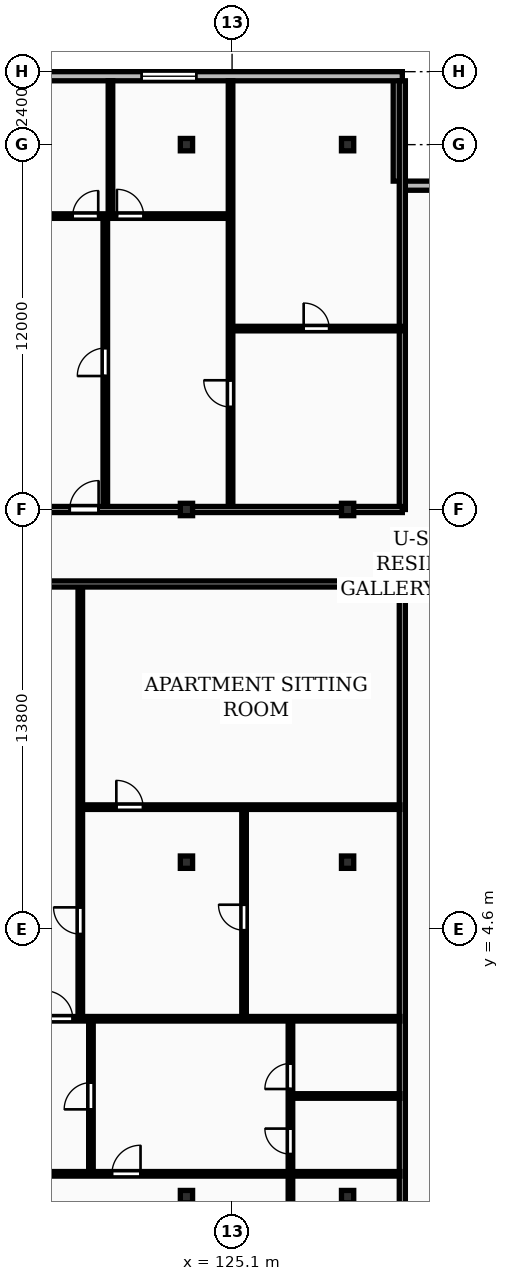
"""IFC4 building model, lengths in metres.
Left out: names, types, materials, properties, quantities, classifications, styles, units other than length and angle.
Written with IfcOpenShell. Run it as: python <this file> out.ifc"""

import sys

from ifc_helpers import new_model, si_unit, direction, frame, frame_2d, origin, origin_2d, place, context, subcontext, project, spatial, rectangle, i_section, extrude, element, fill, save


model = new_model("IFC4")
c1 = context("Model", 3, precision=1e-05, world=origin(), true_north=direction((0.0, 1.0)))
c2 = subcontext(c1, "Body", "Model", "MODEL_VIEW")
j1 = project(units=[si_unit("LENGTHUNIT", "METRE"), si_unit("PLANEANGLEUNIT", "RADIAN")], contexts=[c1])
p1 = place(None, origin())
s1 = spatial("IfcSite", under=j1, at=p1, CompositionType="ELEMENT")
p2 = place(p1, origin())
s2 = spatial("IfcBuilding", under=s1, at=p2, CompositionType="ELEMENT")
p3 = place(p2, frame((0.0, 0.0, 153.7)))
s3 = spatial("IfcBuildingStorey", under=s2, at=p3, CompositionType="ELEMENT", Elevation=153.7)
for number, where, z_axis, x_axis in (
    (1, (123.6, -4.2, 0.0), (0.0, 0.0, 1.0), (1.0, 0.0, 0.0)),
    (2, (123.6, 6.8, 0.0), (0.0, 0.0, 1.0), (1.0, 0.0, 0.0)),
    (3, (123.6, 18.4, 0.0), (0.0, 0.0, 1.0), (1.0, 0.0, 0.0)),
    (4, (123.6, 30.4, 0.0), (0.0, 0.0, 1.0), (1.0, 0.0, 0.0)),
    (5, (128.9, -4.2, 0.0), (0.0, 0.0, 1.0), (1.0, 0.0, 0.0)),
    (6, (128.9, 6.8, 0.0), (0.0, 0.0, 1.0), (1.0, 0.0, 0.0)),
    (7, (128.9, 18.4, 0.0), (0.0, 0.0, 1.0), (1.0, 0.0, 0.0)),
    (8, (128.9, 30.4, 0.0), (0.0, 0.0, 1.0), (1.0, 0.0, 0.0)),
):
    element("IfcColumn", number, at=place(p3, frame(where, z_axis=z_axis, x_axis=x_axis)), inside=s3, PredefinedType="COLUMN", context=c2, shape_type="SweptSolid", body=[
        extrude(i_section(OverallWidth=0.403, OverallDepth=0.406, WebThickness=0.027, FlangeThickness=0.043, FilletRadius=0.015, at=origin_2d()), origin(), (0.0, 0.0, 1.0), 3.6),
    ])
for number, where, z_axis, x_axis in (
    (9, (134.3, 29.05, 0.0), (0.0, 0.0, 1.0), (-1.0, 0.0, 0.0)),
    (10, (130.55, 29.2, 0.0), (0.0, 0.0, 1.0), (0.0, 1.0, 0.0)),
):
    element("IfcWall", number, at=place(p3, frame(where, z_axis=z_axis, x_axis=x_axis)), inside=s3, PredefinedType="STANDARD", context=c2, shape_type="SweptSolid", body=[
        extrude(rectangle(XDim=3.6, YDim=0.3, at=frame_2d((1.8, 0.0))), origin(), (0.0, 0.0, 1.0), 3.32),
    ])
p4 = place(p3, frame((130.7, 32.65, 0.0), z_axis=(0.0, 0.0, 1.0), x_axis=(-1.0, 0.0, 0.0)))
e11 = element("IfcWall", 11, at=p4, inside=s3, PredefinedType="STANDARD", context=c2, shape_type="SweptSolid", body=[
    extrude(rectangle(XDim=58.0, YDim=0.3, at=frame_2d((29.0, 0.0))), origin(), (0.0, 0.0, 1.0), 3.32),
])
p5 = place(p4, frame((50.125, 0.0, 0.85)))
e12 = element("IfcOpeningElement", 12, at=p5, cuts=e11, PredefinedType="OPENING", context=c2, shape_type="SweptSolid", body=[
    extrude(rectangle(XDim=1.8, YDim=1.8, at=frame_2d((0.9, 0.9))), frame((0.0, 0.16, 0.0), z_axis=(0.0, -1.0, 0.0), x_axis=(1.0, 0.0, 0.0)), (0.0, 0.0, 1.0), 0.32),
])
p6 = place(p4, frame((6.775, 0.0, 0.85)))
e13 = element("IfcOpeningElement", 13, at=p6, cuts=e11, PredefinedType="OPENING", context=c2, shape_type="SweptSolid", body=[
    extrude(rectangle(XDim=1.8, YDim=1.8, at=frame_2d((0.9, 0.9))), frame((0.0, 0.16, 0.0), z_axis=(0.0, -1.0, 0.0), x_axis=(1.0, 0.0, 0.0)), (0.0, 0.0, 1.0), 0.32),
])
p7 = place(p4, frame((38.0, 0.0, 0.0)))
e14 = element("IfcOpeningElement", 14, at=p7, cuts=e11, PredefinedType="OPENING", context=c2, shape_type="SweptSolid", body=[
    extrude(rectangle(XDim=1.1, YDim=2.1, at=frame_2d((0.55, 1.05))), frame((0.0, 0.16, 0.0), z_axis=(0.0, -1.0, 0.0), x_axis=(1.0, 0.0, 0.0)), (0.0, 0.0, 1.0), 0.32),
])
p8 = place(p3, frame((130.7, 18.4, 0.0), z_axis=(0.0, 0.0, 1.0), x_axis=(0.0, 1.0, 0.0)))
e15 = element("IfcWall", 15, at=p8, inside=s3, PredefinedType="PARTITIONING", context=c2, shape_type="SweptSolid", body=[
    extrude(rectangle(XDim=14.1, YDim=0.2, at=frame_2d((7.05, 0.0))), origin(), (0.0, 0.0, 1.0), 3.32),
])
p9 = place(p3, frame((125.05, 24.35, 0.0), z_axis=(0.0, 0.0, 1.0), x_axis=(1.0, 0.0, 0.0)))
e16 = element("IfcWall", 16, at=p9, inside=s3, PredefinedType="PARTITIONING", context=c2, shape_type="SweptSolid", body=[
    extrude(rectangle(XDim=5.65, YDim=0.15, at=frame_2d((2.825, 0.0))), origin(), (0.0, 0.0, 1.0), 3.32),
])
p10 = place(p9, frame((2.405, 0.0, 0.0)))
e17 = element("IfcOpeningElement", 17, at=p10, cuts=e16, PredefinedType="OPENING", context=c2, shape_type="SweptSolid", body=[
    extrude(rectangle(XDim=0.84, YDim=2.04, at=frame_2d((0.42, 1.02))), frame((0.0, 0.085, 0.0), z_axis=(0.0, -1.0, 0.0), x_axis=(1.0, 0.0, 0.0)), (0.0, 0.0, 1.0), 0.17),
])
p11 = place(p3, frame((125.05, 18.45, 0.0), z_axis=(0.0, 0.0, 1.0), x_axis=(0.0, 1.0, 0.0)))
e18 = element("IfcWall", 18, at=p11, inside=s3, PredefinedType="PARTITIONING", context=c2, shape_type="SweptSolid", body=[
    extrude(rectangle(XDim=14.05, YDim=0.15, at=frame_2d((7.025, 0.0))), origin(), (0.0, 0.0, 1.0), 3.32),
])
p12 = place(p11, frame((3.32, 0.0, 0.0)))
e19 = element("IfcOpeningElement", 19, at=p12, cuts=e18, PredefinedType="OPENING", context=c2, shape_type="SweptSolid", body=[
    extrude(rectangle(XDim=0.88, YDim=2.06, at=frame_2d((0.44, 1.03))), frame((0.0, 0.085, 0.0), z_axis=(0.0, -1.0, 0.0), x_axis=(1.0, 0.0, 0.0)), (0.0, 0.0, 1.0), 0.17),
])
p13 = place(p3, frame((120.93, 18.45, 0.0), z_axis=(0.0, 0.0, 1.0), x_axis=(0.0, 1.0, 0.0)))
e20 = element("IfcWall", 20, at=p13, inside=s3, PredefinedType="PARTITIONING", context=c2, shape_type="SweptSolid", body=[
    extrude(rectangle(XDim=9.6, YDim=0.15, at=frame_2d((4.8, 0.0))), origin(), (0.0, 0.0, 1.0), 3.32),
])
p14 = place(p13, frame((4.34, 0.0, 0.0)))
e21 = element("IfcOpeningElement", 21, at=p14, cuts=e20, PredefinedType="OPENING", context=c2, shape_type="SweptSolid", body=[
    extrude(rectangle(XDim=0.92, YDim=2.08, at=frame_2d((0.46, 1.04))), frame((0.0, 0.085, 0.0), z_axis=(0.0, -1.0, 0.0), x_axis=(1.0, 0.0, 0.0)), (0.0, 0.0, 1.0), 0.17),
])
p15 = place(p3, frame((121.1, 28.05, 0.0), z_axis=(0.0, 0.0, 1.0), x_axis=(0.0, 1.0, 0.0)))
e22 = element("IfcWall", 22, at=p15, inside=s3, PredefinedType="PARTITIONING", context=c2, shape_type="SweptSolid", body=[
    extrude(rectangle(XDim=4.45, YDim=0.15, at=frame_2d((2.225, 0.0))), origin(), (0.0, 0.0, 1.0), 3.32),
])
p16 = place(p3, frame((118.27, 28.05, 0.0), z_axis=(0.0, 0.0, 1.0), x_axis=(1.0, 0.0, 0.0)))
e23 = element("IfcWall", 23, at=p16, inside=s3, PredefinedType="PARTITIONING", context=c2, shape_type="SweptSolid", body=[
    extrude(rectangle(XDim=6.76, YDim=0.15, at=frame_2d((3.38, 0.0))), origin(), (0.0, 0.0, 1.0), 3.32),
])
p17 = place(p16, frame((1.587, 0.0, 0.0)))
e24 = element("IfcOpeningElement", 24, at=p17, cuts=e23, PredefinedType="OPENING", context=c2, shape_type="SweptSolid", body=[
    extrude(rectangle(XDim=0.84, YDim=2.04, at=frame_2d((0.42, 1.02))), frame((0.0, 0.085, 0.0), z_axis=(0.0, -1.0, 0.0), x_axis=(1.0, 0.0, 0.0)), (0.0, 0.0, 1.0), 0.17),
])
p18 = place(p16, frame((3.042, 0.0, 0.0)))
e25 = element("IfcOpeningElement", 25, at=p18, cuts=e23, PredefinedType="OPENING", context=c2, shape_type="SweptSolid", body=[
    extrude(rectangle(XDim=0.88, YDim=2.06, at=frame_2d((0.44, 1.03))), frame((0.0, 0.085, 0.0), z_axis=(0.0, -1.0, 0.0), x_axis=(1.0, 0.0, 0.0)), (0.0, 0.0, 1.0), 0.17),
])
p19 = place(p3, frame((118.25, 18.4, 0.0), z_axis=(0.0, 0.0, 1.0), x_axis=(1.0, 0.0, 0.0)))
e26 = element("IfcWall", 26, at=p19, inside=s3, PredefinedType="PARTITIONING", context=c2, shape_type="SweptSolid", body=[
    extrude(rectangle(XDim=12.45, YDim=0.2, at=frame_2d((6.225, 0.0))), origin(), (0.0, 0.0, 1.0), 2.708),
])
p20 = place(p19, frame((1.51, 0.0, 0.0)))
e27 = element("IfcOpeningElement", 27, at=p20, cuts=e26, PredefinedType="OPENING", context=c2, shape_type="SweptSolid", body=[
    extrude(rectangle(XDim=0.95, YDim=2.15, at=frame_2d((0.475, 1.075))), frame((0.0, 0.11, 0.0), z_axis=(0.0, -1.0, 0.0), x_axis=(1.0, 0.0, 0.0)), (0.0, 0.0, 1.0), 0.22),
])
p21 = place(p3, frame((130.7, -8.7, 0.0), z_axis=(0.0, 0.0, 1.0), x_axis=(0.0, 1.0, 0.0)))
e28 = element("IfcWall", 28, at=p21, inside=s3, PredefinedType="PARTITIONING", context=c2, shape_type="SweptSolid", body=[
    extrude(rectangle(XDim=24.57, YDim=0.2, at=frame_2d((12.285, 0.0))), origin(), (0.0, 0.0, 1.0), 3.32),
])
p22 = place(p3, frame((125.494, 1.69, 0.0), z_axis=(0.0, 0.0, 1.0), x_axis=(0.0, 1.0, 0.0)))
e29 = element("IfcWall", 29, at=p22, inside=s3, PredefinedType="PARTITIONING", context=c2, shape_type="SweptSolid", body=[
    extrude(rectangle(XDim=6.92, YDim=0.15, at=frame_2d((3.46, 0.0))), origin(), (0.0, 0.0, 1.0), 3.32),
])
p23 = place(p22, frame((2.871, 0.0, 0.0)))
e30 = element("IfcOpeningElement", 30, at=p23, cuts=e29, PredefinedType="OPENING", context=c2, shape_type="SweptSolid", body=[
    extrude(rectangle(XDim=0.84, YDim=2.04, at=frame_2d((0.42, 1.02))), frame((0.0, 0.085, 0.0), z_axis=(0.0, -1.0, 0.0), x_axis=(1.0, 0.0, 0.0)), (0.0, 0.0, 1.0), 0.17),
])
p24 = place(p3, frame((120.168, 8.61, 0.0), z_axis=(0.0, 0.0, 1.0), x_axis=(1.0, 0.0, 0.0)))
e31 = element("IfcWall", 31, at=p24, inside=s3, PredefinedType="PARTITIONING", context=c2, shape_type="SweptSolid", body=[
    extrude(rectangle(XDim=10.452, YDim=0.15, at=frame_2d((5.226, 0.0))), origin(), (0.0, 0.0, 1.0), 3.32),
])
p25 = place(p24, frame((1.125, 0.0, 0.0)))
e32 = element("IfcOpeningElement", 32, at=p25, cuts=e31, PredefinedType="OPENING", context=c2, shape_type="SweptSolid", body=[
    extrude(rectangle(XDim=0.88, YDim=2.06, at=frame_2d((0.44, 1.03))), frame((0.0, 0.085, 0.0), z_axis=(0.0, -1.0, 0.0), x_axis=(1.0, 0.0, 0.0)), (0.0, 0.0, 1.0), 0.17),
])
p26 = place(p3, frame((120.108, 1.69, 0.0), z_axis=(0.0, 0.0, 1.0), x_axis=(0.0, 1.0, 0.0)))
e33 = element("IfcWall", 33, at=p26, inside=s3, PredefinedType="PARTITIONING", context=c2, shape_type="SweptSolid", body=[
    extrude(rectangle(XDim=14.2, YDim=0.15, at=frame_2d((7.1, 0.0))), origin(), (0.0, 0.0, 1.0), 3.32),
])
p27 = place(p26, frame((2.744, 0.0, 0.0)))
e34 = element("IfcOpeningElement", 34, at=p27, cuts=e33, PredefinedType="OPENING", context=c2, shape_type="SweptSolid", body=[
    extrude(rectangle(XDim=0.88, YDim=2.06, at=frame_2d((0.44, 1.03))), frame((0.0, 0.085, 0.0), z_axis=(0.0, -1.0, 0.0), x_axis=(1.0, 0.0, 0.0)), (0.0, 0.0, 1.0), 0.17),
])
p28 = place(p3, frame((120.458, -3.39, 0.0), z_axis=(0.0, 0.0, 1.0), x_axis=(0.0, 1.0, 0.0)))
e35 = element("IfcWall", 35, at=p28, inside=s3, PredefinedType="PARTITIONING", context=c2, shape_type="SweptSolid", body=[
    extrude(rectangle(XDim=5.0, YDim=0.15, at=frame_2d((2.5, 0.0))), origin(), (0.0, 0.0, 1.0), 3.32),
])
p29 = place(p28, frame((2.06, 0.0, 0.0)))
e36 = element("IfcOpeningElement", 36, at=p29, cuts=e35, PredefinedType="OPENING", context=c2, shape_type="SweptSolid", body=[
    extrude(rectangle(XDim=0.88, YDim=2.06, at=frame_2d((0.44, 1.03))), frame((0.0, 0.085, 0.0), z_axis=(0.0, -1.0, 0.0), x_axis=(1.0, 0.0, 0.0)), (0.0, 0.0, 1.0), 0.17),
])
p30 = place(p3, frame((127.08, -0.89, 0.0), z_axis=(0.0, 0.0, 1.0), x_axis=(1.0, 0.0, 0.0)))
e37 = element("IfcWall", 37, at=p30, inside=s3, PredefinedType="PARTITIONING", context=c2, shape_type="SweptSolid", body=[
    extrude(rectangle(XDim=3.54, YDim=0.15, at=frame_2d((1.77, 0.0))), origin(), (0.0, 0.0, 1.0), 3.32),
])
p31 = place(p3, frame((127.02, -8.7, 0.0), z_axis=(0.0, 0.0, 1.0), x_axis=(0.0, 1.0, 0.0)))
e38 = element("IfcWall", 38, at=p31, inside=s3, PredefinedType="PARTITIONING", context=c2, shape_type="SweptSolid", body=[
    extrude(rectangle(XDim=10.31, YDim=0.15, at=frame_2d((5.155, 0.0))), origin(), (0.0, 0.0, 1.0), 3.32),
])
p32 = place(p31, frame((5.897, 0.0, 0.0)))
e39 = element("IfcOpeningElement", 39, at=p32, cuts=e38, PredefinedType="OPENING", context=c2, shape_type="SweptSolid", body=[
    extrude(rectangle(XDim=0.84, YDim=2.04, at=frame_2d((0.42, 1.02))), frame((0.0, 0.085, 0.0), z_axis=(0.0, -1.0, 0.0), x_axis=(1.0, 0.0, 0.0)), (0.0, 0.0, 1.0), 0.17),
])
p33 = place(p31, frame((8.04, 0.0, 0.0)))
e40 = element("IfcOpeningElement", 40, at=p33, cuts=e38, PredefinedType="OPENING", context=c2, shape_type="SweptSolid", body=[
    extrude(rectangle(XDim=0.84, YDim=2.04, at=frame_2d((0.42, 1.02))), frame((0.0, 0.085, 0.0), z_axis=(0.0, -1.0, 0.0), x_axis=(1.0, 0.0, 0.0)), (0.0, 0.0, 1.0), 0.17),
])
p34 = place(p31, frame((2.21, 0.0, 0.0)))
e41 = element("IfcOpeningElement", 41, at=p34, cuts=e38, PredefinedType="OPENING", context=c2, shape_type="SweptSolid", body=[
    extrude(rectangle(XDim=0.88, YDim=2.06, at=frame_2d((0.44, 1.03))), frame((0.0, 0.085, 0.0), z_axis=(0.0, -1.0, 0.0), x_axis=(1.0, 0.0, 0.0)), (0.0, 0.0, 1.0), 0.17),
])
p35 = place(p3, frame((116.218, 1.65, 0.0), z_axis=(0.0, 0.0, 1.0), x_axis=(1.0, 0.0, 0.0)))
e42 = element("IfcWall", 42, at=p35, inside=s3, PredefinedType="PARTITIONING", context=c2, shape_type="SweptSolid", body=[
    extrude(rectangle(XDim=14.402, YDim=0.15, at=frame_2d((7.201, 0.0))), origin(), (0.0, 0.0, 1.0), 3.32),
])
p36 = place(p35, frame((2.72, 0.0, 0.0)))
e43 = element("IfcOpeningElement", 43, at=p36, cuts=e42, PredefinedType="OPENING", context=c2, shape_type="SweptSolid", body=[
    extrude(rectangle(XDim=0.92, YDim=2.08, at=frame_2d((0.46, 1.04))), frame((0.0, 0.085, 0.0), z_axis=(0.0, -1.0, 0.0), x_axis=(1.0, 0.0, 0.0)), (0.0, 0.0, 1.0), 0.17),
])
p37 = place(p3, frame((116.218, -3.45, 0.0), z_axis=(0.0, 0.0, 1.0), x_axis=(1.0, 0.0, 0.0)))
e44 = element("IfcWall", 44, at=p37, inside=s3, PredefinedType="PARTITIONING", context=c2, shape_type="SweptSolid", body=[
    extrude(rectangle(XDim=14.402, YDim=0.15, at=frame_2d((7.201, 0.0))), origin(), (0.0, 0.0, 1.0), 3.32),
])
p38 = place(p37, frame((4.931, 0.0, 0.0)))
e45 = element("IfcOpeningElement", 45, at=p38, cuts=e44, PredefinedType="OPENING", context=c2, shape_type="SweptSolid", body=[
    extrude(rectangle(XDim=0.94, YDim=2.1, at=frame_2d((0.47, 1.05))), frame((0.0, 0.085, 0.0), z_axis=(0.0, -1.0, 0.0), x_axis=(1.0, 0.0, 0.0)), (0.0, 0.0, 1.0), 0.17),
])
p39 = place(p3, frame((72.7, 15.95, 0.0), z_axis=(0.0, 0.0, 1.0), x_axis=(1.0, 0.0, 0.0)))
e46 = element("IfcWall", 46, at=p39, inside=s3, PredefinedType="PARTITIONING", context=c2, shape_type="SweptSolid", body=[
    extrude(rectangle(XDim=58.0, YDim=0.2, at=frame_2d((29.0, 0.0))), origin(), (0.0, 0.0, 1.0), 3.32),
])
p40 = place(p39, frame((10.967, 0.0, 0.0)))
e47 = element("IfcOpeningElement", 47, at=p40, cuts=e46, PredefinedType="OPENING", context=c2, shape_type="SweptSolid", body=[
    extrude(rectangle(XDim=1.22, YDim=2.18, at=frame_2d((0.61, 1.09))), frame((0.0, 0.11, 0.0), z_axis=(0.0, -1.0, 0.0), x_axis=(1.0, 0.0, 0.0)), (0.0, 0.0, 1.0), 0.22),
])
p41 = place(p39, frame((31.36, 0.0, 0.0)))
e48 = element("IfcOpeningElement", 48, at=p41, cuts=e46, PredefinedType="OPENING", context=c2, shape_type="SweptSolid", body=[
    extrude(rectangle(XDim=1.22, YDim=2.18, at=frame_2d((0.61, 1.09))), frame((0.0, 0.11, 0.0), z_axis=(0.0, -1.0, 0.0), x_axis=(1.0, 0.0, 0.0)), (0.0, 0.0, 1.0), 0.22),
])
p42 = place(p39, frame((45.483, 0.0, 0.0)))
e49 = element("IfcOpeningElement", 49, at=p42, cuts=e46, PredefinedType="OPENING", context=c2, shape_type="SweptSolid", body=[
    extrude(rectangle(XDim=0.95, YDim=2.15, at=frame_2d((0.475, 1.075))), frame((0.0, 0.11, 0.0), z_axis=(0.0, -1.0, 0.0), x_axis=(1.0, 0.0, 0.0)), (0.0, 0.0, 1.0), 0.22),
])
p43 = place(p6, origin())
e50 = element("IfcWindow", 50, at=p43, inside=s3, PartitioningType="SINGLE_PANEL", PredefinedType="WINDOW", context=c2, shape_type="SweptSolid", body=[
    extrude(rectangle(XDim=1.8, YDim=1.8, at=frame_2d((0.9, 0.9))), frame((0.0, 0.03, 0.0), z_axis=(0.0, -1.0, 0.0), x_axis=(1.0, 0.0, 0.0)), (0.0, 0.0, 1.0), 0.06),
])
fill(e13, e50)
p44 = place(p10, origin())
e51 = element("IfcDoor", 51, at=p44, inside=s3, OperationType="SINGLE_SWING_LEFT", PredefinedType="DOOR", context=c2, shape_type="SweptSolid", body=[
    extrude(rectangle(XDim=0.84, YDim=2.04, at=frame_2d((0.42, 1.02))), frame((0.0, 0.025, 0.0), z_axis=(0.0, -1.0, 0.0), x_axis=(1.0, 0.0, 0.0)), (0.0, 0.0, 1.0), 0.05),
])
fill(e17, e51)
p45 = place(p12, origin())
e52 = element("IfcDoor", 52, at=p45, inside=s3, OperationType="SINGLE_SWING_RIGHT", PredefinedType="DOOR", context=c2, shape_type="SweptSolid", body=[
    extrude(rectangle(XDim=0.88, YDim=2.06, at=frame_2d((0.44, 1.03))), frame((0.0, 0.025, 0.0), z_axis=(0.0, -1.0, 0.0), x_axis=(1.0, 0.0, 0.0)), (0.0, 0.0, 1.0), 0.05),
])
fill(e19, e52)
p46 = place(p14, origin())
e53 = element("IfcDoor", 53, at=p46, inside=s3, OperationType="SINGLE_SWING_LEFT", PredefinedType="DOOR", context=c2, shape_type="SweptSolid", body=[
    extrude(rectangle(XDim=0.92, YDim=2.08, at=frame_2d((0.46, 1.04))), frame((0.0, 0.025, 0.0), z_axis=(0.0, -1.0, 0.0), x_axis=(1.0, 0.0, 0.0)), (0.0, 0.0, 1.0), 0.05),
])
fill(e21, e53)
p47 = place(p17, origin())
e54 = element("IfcDoor", 54, at=p47, inside=s3, OperationType="SINGLE_SWING_RIGHT", PredefinedType="DOOR", context=c2, shape_type="SweptSolid", body=[
    extrude(rectangle(XDim=0.84, YDim=2.04, at=frame_2d((0.42, 1.02))), frame((0.0, 0.025, 0.0), z_axis=(0.0, -1.0, 0.0), x_axis=(1.0, 0.0, 0.0)), (0.0, 0.0, 1.0), 0.05),
])
fill(e24, e54)
p48 = place(p18, origin())
e55 = element("IfcDoor", 55, at=p48, inside=s3, OperationType="SINGLE_SWING_LEFT", PredefinedType="DOOR", context=c2, shape_type="SweptSolid", body=[
    extrude(rectangle(XDim=0.88, YDim=2.06, at=frame_2d((0.44, 1.03))), frame((0.0, 0.025, 0.0), z_axis=(0.0, -1.0, 0.0), x_axis=(1.0, 0.0, 0.0)), (0.0, 0.0, 1.0), 0.05),
])
fill(e25, e55)
p49 = place(p20, origin())
e56 = element("IfcDoor", 56, at=p49, inside=s3, OperationType="SINGLE_SWING_RIGHT", PredefinedType="DOOR", context=c2, shape_type="SweptSolid", body=[
    extrude(rectangle(XDim=0.95, YDim=2.15, at=frame_2d((0.475, 1.075))), frame((0.0, 0.025, 0.0), z_axis=(0.0, -1.0, 0.0), x_axis=(1.0, 0.0, 0.0)), (0.0, 0.0, 1.0), 0.05),
])
fill(e27, e56)
p50 = place(p23, origin())
e57 = element("IfcDoor", 57, at=p50, inside=s3, OperationType="SINGLE_SWING_RIGHT", PredefinedType="DOOR", context=c2, shape_type="SweptSolid", body=[
    extrude(rectangle(XDim=0.84, YDim=2.04, at=frame_2d((0.42, 1.02))), frame((0.0, 0.025, 0.0), z_axis=(0.0, -1.0, 0.0), x_axis=(1.0, 0.0, 0.0)), (0.0, 0.0, 1.0), 0.05),
])
fill(e30, e57)
p51 = place(p25, origin())
e58 = element("IfcDoor", 58, at=p51, inside=s3, OperationType="SINGLE_SWING_LEFT", PredefinedType="DOOR", context=c2, shape_type="SweptSolid", body=[
    extrude(rectangle(XDim=0.88, YDim=2.06, at=frame_2d((0.44, 1.03))), frame((0.0, 0.025, 0.0), z_axis=(0.0, -1.0, 0.0), x_axis=(1.0, 0.0, 0.0)), (0.0, 0.0, 1.0), 0.05),
])
fill(e32, e58)
p52 = place(p27, origin())
e59 = element("IfcDoor", 59, at=p52, inside=s3, OperationType="SINGLE_SWING_RIGHT", PredefinedType="DOOR", context=c2, shape_type="SweptSolid", body=[
    extrude(rectangle(XDim=0.88, YDim=2.06, at=frame_2d((0.44, 1.03))), frame((0.0, 0.025, 0.0), z_axis=(0.0, -1.0, 0.0), x_axis=(1.0, 0.0, 0.0)), (0.0, 0.0, 1.0), 0.05),
])
fill(e34, e59)
p53 = place(p29, origin())
e60 = element("IfcDoor", 60, at=p53, inside=s3, OperationType="SINGLE_SWING_LEFT", PredefinedType="DOOR", context=c2, shape_type="SweptSolid", body=[
    extrude(rectangle(XDim=0.88, YDim=2.06, at=frame_2d((0.44, 1.03))), frame((0.0, 0.025, 0.0), z_axis=(0.0, -1.0, 0.0), x_axis=(1.0, 0.0, 0.0)), (0.0, 0.0, 1.0), 0.05),
])
fill(e36, e60)
p54 = place(p32, origin())
e61 = element("IfcDoor", 61, at=p54, inside=s3, OperationType="SINGLE_SWING_RIGHT", PredefinedType="DOOR", context=c2, shape_type="SweptSolid", body=[
    extrude(rectangle(XDim=0.84, YDim=2.04, at=frame_2d((0.42, 1.02))), frame((0.0, 0.025, 0.0), z_axis=(0.0, -1.0, 0.0), x_axis=(1.0, 0.0, 0.0)), (0.0, 0.0, 1.0), 0.05),
])
fill(e39, e61)
p55 = place(p33, origin())
e62 = element("IfcDoor", 62, at=p55, inside=s3, OperationType="SINGLE_SWING_LEFT", PredefinedType="DOOR", context=c2, shape_type="SweptSolid", body=[
    extrude(rectangle(XDim=0.84, YDim=2.04, at=frame_2d((0.42, 1.02))), frame((0.0, 0.025, 0.0), z_axis=(0.0, -1.0, 0.0), x_axis=(1.0, 0.0, 0.0)), (0.0, 0.0, 1.0), 0.05),
])
fill(e40, e62)
p56 = place(p36, origin())
e63 = element("IfcDoor", 63, at=p56, inside=s3, OperationType="SINGLE_SWING_LEFT", PredefinedType="DOOR", context=c2, shape_type="SweptSolid", body=[
    extrude(rectangle(XDim=0.92, YDim=2.08, at=frame_2d((0.46, 1.04))), frame((0.0, 0.025, 0.0), z_axis=(0.0, -1.0, 0.0), x_axis=(1.0, 0.0, 0.0)), (0.0, 0.0, 1.0), 0.05),
])
fill(e43, e63)
p57 = place(p38, origin())
e64 = element("IfcDoor", 64, at=p57, inside=s3, OperationType="SINGLE_SWING_RIGHT", PredefinedType="DOOR", context=c2, shape_type="SweptSolid", body=[
    extrude(rectangle(XDim=0.94, YDim=2.1, at=frame_2d((0.47, 1.05))), frame((0.0, 0.025, 0.0), z_axis=(0.0, -1.0, 0.0), x_axis=(1.0, 0.0, 0.0)), (0.0, 0.0, 1.0), 0.05),
])
fill(e45, e64)
save(model, sys.argv[1])
